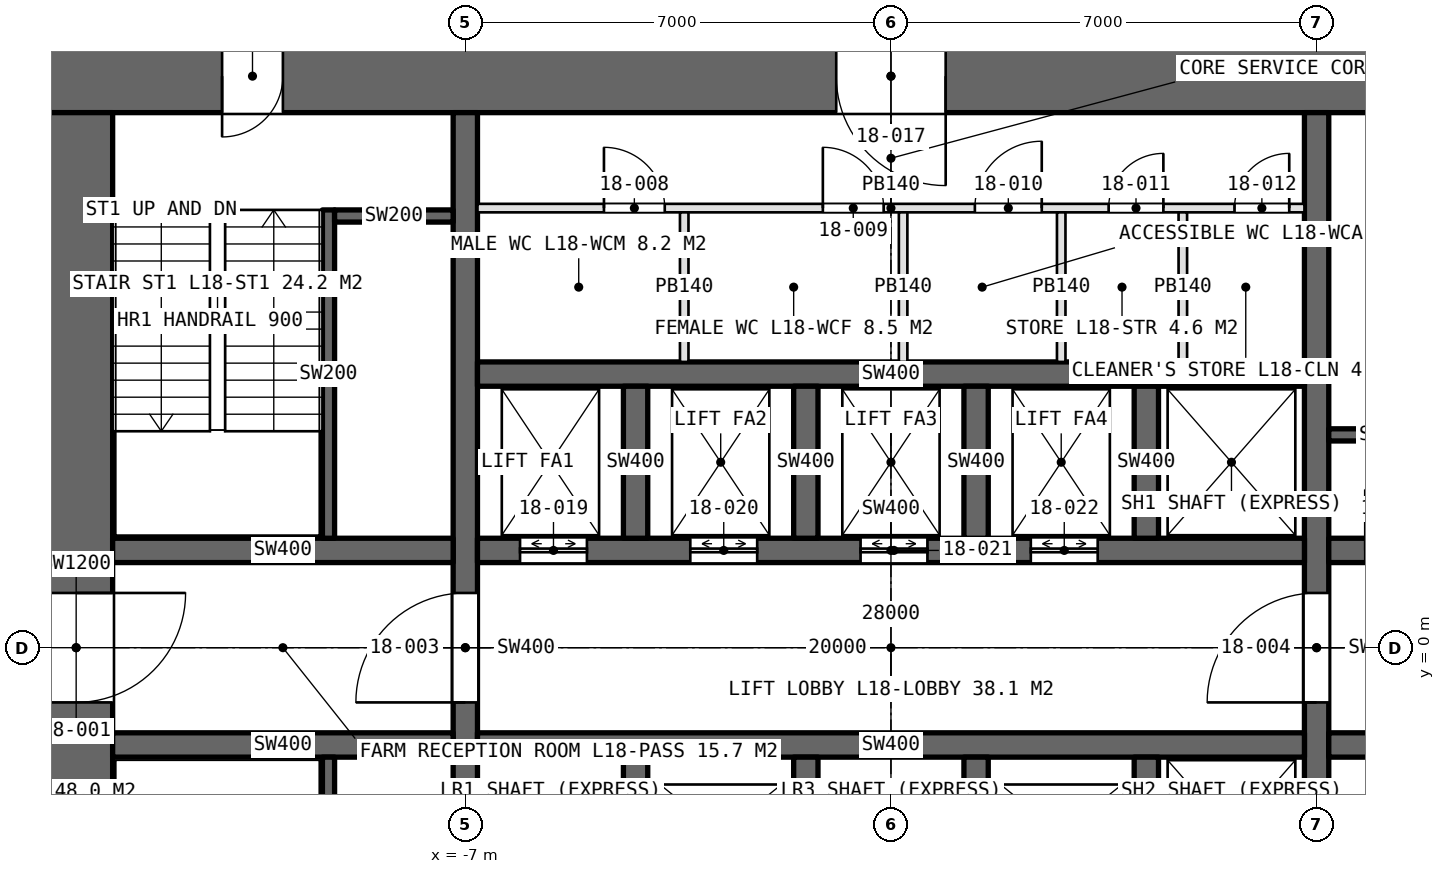
"""IFC4 building model, lengths in metres.
Left out: names, types, materials, properties, quantities, classifications, styles, units other than length and angle.
Written with IfcOpenShell. Run it as: python <this file> out.ifc"""

import sys

from ifc_helpers import new_model, si_unit, direction, frame, frame_2d, origin, place, context, subcontext, project, spatial, rectangle, extrude, element, fill, save


model = new_model("IFC4")
c1 = context("Model", 3, precision=1e-05, world=origin(), true_north=direction((0.0, 1.0)))
c2 = subcontext(c1, "Body", "Model", "MODEL_VIEW")
j1 = project(units=[si_unit("LENGTHUNIT", "METRE"), si_unit("PLANEANGLEUNIT", "RADIAN")], contexts=[c1])
p1 = place(None, origin())
s1 = spatial("IfcSite", under=j1, at=p1, CompositionType="ELEMENT")
p2 = place(p1, origin())
s2 = spatial("IfcBuilding", under=s1, at=p2, CompositionType="ELEMENT")
p3 = place(p2, frame((0.0, 0.0, 90.0)))
s3 = spatial("IfcBuildingStorey", under=s2, at=p3, CompositionType="ELEMENT", Elevation=90.0)
p4 = place(p3, frame((14.0, 9.4, 0.0), z_axis=(0.0, 0.0, 1.0), x_axis=(-1.0, 0.0, 0.0)))
e1 = element("IfcWall", 1, at=p4, inside=s3, PredefinedType="SHEAR", context=c2, shape_type="SweptSolid", body=[
    extrude(rectangle(XDim=28.0, YDim=1.2, at=frame_2d((14.0, 0.0))), origin(), (0.0, 0.0, 1.0), 5.0),
])
p5 = place(p4, frame((24.0, 0.0, 0.0)))
e2 = element("IfcOpeningElement", 2, at=p5, cuts=e1, PredefinedType="OPENING", context=c2, shape_type="SweptSolid", body=[
    extrude(rectangle(XDim=1.0, YDim=2.4, at=frame_2d((0.5, 1.2))), frame((0.0, 0.61, 0.0), z_axis=(0.0, -1.0, 0.0), x_axis=(1.0, 0.0, 0.0)), (0.0, 0.0, 1.0), 1.22),
])
p6 = place(p4, frame((13.1, 0.0, 0.0)))
e3 = element("IfcOpeningElement", 3, at=p6, cuts=e1, PredefinedType="OPENING", context=c2, shape_type="SweptSolid", body=[
    extrude(rectangle(XDim=1.8, YDim=2.4, at=frame_2d((0.9, 1.2))), frame((0.0, 0.61, 0.0), z_axis=(0.0, -1.0, 0.0), x_axis=(1.0, 0.0, 0.0)), (0.0, 0.0, 1.0), 1.22),
])
p7 = place(p3, frame((-13.4, 8.8, 0.0), z_axis=(0.0, 0.0, 1.0), x_axis=(0.0, -1.0, 0.0)))
e4 = element("IfcWall", 4, at=p7, inside=s3, PredefinedType="SHEAR", context=c2, shape_type="SweptSolid", body=[
    extrude(rectangle(XDim=17.6, YDim=1.2, at=frame_2d((8.8, 0.0))), origin(), (0.0, 0.0, 1.0), 5.0),
])
p8 = place(p7, frame((7.9, 0.0, 0.0)))
e5 = element("IfcOpeningElement", 5, at=p8, cuts=e4, PredefinedType="OPENING", context=c2, shape_type="SweptSolid", body=[
    extrude(rectangle(XDim=1.8, YDim=2.4, at=frame_2d((0.9, 1.2))), frame((0.0, 0.61, 0.0), z_axis=(0.0, -1.0, 0.0), x_axis=(1.0, 0.0, 0.0)), (0.0, 0.0, 1.0), 1.22),
])
p9 = place(p7, frame((16.5, 0.0, 0.0)))
e6 = element("IfcOpeningElement", 6, at=p9, cuts=e4, PredefinedType="OPENING", context=c2, shape_type="SweptSolid", body=[
    extrude(rectangle(XDim=1.0, YDim=2.4, at=frame_2d((0.5, 1.2))), frame((0.0, 0.61, 0.0), z_axis=(0.0, -1.0, 0.0), x_axis=(1.0, 0.0, 0.0)), (0.0, 0.0, 1.0), 1.22),
])
p10 = place(p3, frame((-7.0, -8.8, 0.0), z_axis=(0.0, 0.0, 1.0), x_axis=(0.0, 1.0, 0.0)))
e7 = element("IfcWall", 7, at=p10, inside=s3, PredefinedType="SHEAR", context=c2, shape_type="SweptSolid", body=[
    extrude(rectangle(XDim=17.6, YDim=0.4, at=frame_2d((8.8, 0.0))), origin(), (0.0, 0.0, 1.0), 5.0),
])
p11 = place(p10, frame((7.9, 0.0, 0.0)))
e8 = element("IfcOpeningElement", 8, at=p11, cuts=e7, PredefinedType="OPENING", context=c2, shape_type="SweptSolid", body=[
    extrude(rectangle(XDim=1.8, YDim=2.4, at=frame_2d((0.9, 1.2))), frame((0.0, 0.21, 0.0), z_axis=(0.0, -1.0, 0.0), x_axis=(1.0, 0.0, 0.0)), (0.0, 0.0, 1.0), 0.42),
])
p12 = place(p3, frame((7.0, -8.8, 0.0), z_axis=(0.0, 0.0, 1.0), x_axis=(0.0, 1.0, 0.0)))
e9 = element("IfcWall", 9, at=p12, inside=s3, PredefinedType="SHEAR", context=c2, shape_type="SweptSolid", body=[
    extrude(rectangle(XDim=17.6, YDim=0.4, at=frame_2d((8.8, 0.0))), origin(), (0.0, 0.0, 1.0), 5.0),
])
p13 = place(p12, frame((7.9, 0.0, 0.0)))
e10 = element("IfcOpeningElement", 10, at=p13, cuts=e9, PredefinedType="OPENING", context=c2, shape_type="SweptSolid", body=[
    extrude(rectangle(XDim=1.8, YDim=2.4, at=frame_2d((0.9, 1.2))), frame((0.0, 0.21, 0.0), z_axis=(0.0, -1.0, 0.0), x_axis=(1.0, 0.0, 0.0)), (0.0, 0.0, 1.0), 0.42),
])
p14 = place(p3, frame((-6.8, 1.6, 0.0), z_axis=(0.0, 0.0, 1.0), x_axis=(1.0, 0.0, 0.0)))
e11 = element("IfcWall", 11, at=p14, inside=s3, PredefinedType="SHEAR", context=c2, shape_type="SweptSolid", body=[
    extrude(rectangle(XDim=13.6, YDim=0.4, at=frame_2d((6.8, 0.0))), origin(), (0.0, 0.0, 1.0), 5.0),
])
p15 = place(p14, frame((0.7, 0.0, 0.0)))
e12 = element("IfcOpeningElement", 12, at=p15, cuts=e11, PredefinedType="OPENING", context=c2, shape_type="SweptSolid", body=[
    extrude(rectangle(XDim=1.1, YDim=2.4, at=frame_2d((0.55, 1.2))), frame((0.0, 0.21, 0.0), z_axis=(0.0, -1.0, 0.0), x_axis=(1.0, 0.0, 0.0)), (0.0, 0.0, 1.0), 0.42),
])
p16 = place(p14, frame((3.5, 0.0, 0.0)))
e13 = element("IfcOpeningElement", 13, at=p16, cuts=e11, PredefinedType="OPENING", context=c2, shape_type="SweptSolid", body=[
    extrude(rectangle(XDim=1.1, YDim=2.4, at=frame_2d((0.55, 1.2))), frame((0.0, 0.21, 0.0), z_axis=(0.0, -1.0, 0.0), x_axis=(1.0, 0.0, 0.0)), (0.0, 0.0, 1.0), 0.42),
])
p17 = place(p14, frame((6.3, 0.0, 0.0)))
e14 = element("IfcOpeningElement", 14, at=p17, cuts=e11, PredefinedType="OPENING", context=c2, shape_type="SweptSolid", body=[
    extrude(rectangle(XDim=1.1, YDim=2.4, at=frame_2d((0.55, 1.2))), frame((0.0, 0.21, 0.0), z_axis=(0.0, -1.0, 0.0), x_axis=(1.0, 0.0, 0.0)), (0.0, 0.0, 1.0), 0.42),
])
p18 = place(p14, frame((9.1, 0.0, 0.0)))
e15 = element("IfcOpeningElement", 15, at=p18, cuts=e11, PredefinedType="OPENING", context=c2, shape_type="SweptSolid", body=[
    extrude(rectangle(XDim=1.1, YDim=2.4, at=frame_2d((0.55, 1.2))), frame((0.0, 0.21, 0.0), z_axis=(0.0, -1.0, 0.0), x_axis=(1.0, 0.0, 0.0)), (0.0, 0.0, 1.0), 0.42),
])
for number, where, z_axis, x_axis in (
    (16, (-6.8, -1.6, 0.0), (0.0, 0.0, 1.0), (1.0, 0.0, 0.0)),
    (17, (-6.8, 4.5, 0.0), (0.0, 0.0, 1.0), (1.0, 0.0, 0.0)),
):
    element("IfcWall", number, at=place(p3, frame(where, z_axis=z_axis, x_axis=x_axis)), inside=s3, PredefinedType="SHEAR", context=c2, shape_type="SweptSolid", body=[
        extrude(rectangle(XDim=13.6, YDim=0.4, at=frame_2d((6.8, 0.0))), origin(), (0.0, 0.0, 1.0), 5.0),
    ])
for number, where, z_axis, x_axis in (
    (18, (-12.8, 1.6, 0.0), (0.0, 0.0, 1.0), (1.0, 0.0, 0.0)),
    (19, (-12.8, -1.6, 0.0), (0.0, 0.0, 1.0), (1.0, 0.0, 0.0)),
):
    element("IfcWall", number, at=place(p3, frame(where, z_axis=z_axis, x_axis=x_axis)), inside=s3, PredefinedType="SHEAR", context=c2, shape_type="SweptSolid", body=[
        extrude(rectangle(XDim=5.6, YDim=0.4, at=frame_2d((2.8, 0.0))), origin(), (0.0, 0.0, 1.0), 5.0),
    ])
p19 = place(p3, frame((7.2, 1.6, 0.0), z_axis=(0.0, 0.0, 1.0), x_axis=(1.0, 0.0, 0.0)))
e20 = element("IfcWall", 20, at=p19, inside=s3, PredefinedType="SHEAR", context=c2, shape_type="SweptSolid", body=[
    extrude(rectangle(XDim=5.6, YDim=0.4, at=frame_2d((2.8, 0.0))), origin(), (0.0, 0.0, 1.0), 5.0),
])
p20 = place(p19, frame((0.6, 0.0, 0.0)))
e21 = element("IfcOpeningElement", 21, at=p20, cuts=e20, PredefinedType="OPENING", context=c2, shape_type="SweptSolid", body=[
    extrude(rectangle(XDim=1.0, YDim=2.4, at=frame_2d((0.5, 1.2))), frame((0.0, 0.21, 0.0), z_axis=(0.0, -1.0, 0.0), x_axis=(1.0, 0.0, 0.0)), (0.0, 0.0, 1.0), 0.42),
])
p21 = place(p3, frame((7.2, -1.6, 0.0), z_axis=(0.0, 0.0, 1.0), x_axis=(1.0, 0.0, 0.0)))
e22 = element("IfcWall", 22, at=p21, inside=s3, PredefinedType="SHEAR", context=c2, shape_type="SweptSolid", body=[
    extrude(rectangle(XDim=5.6, YDim=0.4, at=frame_2d((2.8, 0.0))), origin(), (0.0, 0.0, 1.0), 5.0),
])
p22 = place(p21, frame((0.9, 0.0, 0.0)))
e23 = element("IfcOpeningElement", 23, at=p22, cuts=e22, PredefinedType="OPENING", context=c2, shape_type="SweptSolid", body=[
    extrude(rectangle(XDim=1.3, YDim=2.4, at=frame_2d((0.65, 1.2))), frame((0.0, 0.21, 0.0), z_axis=(0.0, -1.0, 0.0), x_axis=(1.0, 0.0, 0.0)), (0.0, 0.0, 1.0), 0.42),
])
p23 = place(p21, frame((3.9, 0.0, 0.0)))
e24 = element("IfcOpeningElement", 24, at=p23, cuts=e22, PredefinedType="OPENING", context=c2, shape_type="SweptSolid", body=[
    extrude(rectangle(XDim=1.3, YDim=2.4, at=frame_2d((0.65, 1.2))), frame((0.0, 0.21, 0.0), z_axis=(0.0, -1.0, 0.0), x_axis=(1.0, 0.0, 0.0)), (0.0, 0.0, 1.0), 0.42),
])
for number, where, z_axis, x_axis in (
    (25, (-4.2, 1.8, 0.0), (0.0, 0.0, 1.0), (0.0, 1.0, 0.0)),
    (26, (-4.2, -4.3, 0.0), (0.0, 0.0, 1.0), (0.0, 1.0, 0.0)),
    (27, (-1.4, 1.8, 0.0), (0.0, 0.0, 1.0), (0.0, 1.0, 0.0)),
    (28, (-1.4, -4.3, 0.0), (0.0, 0.0, 1.0), (0.0, 1.0, 0.0)),
    (29, (1.4, 1.8, 0.0), (0.0, 0.0, 1.0), (0.0, 1.0, 0.0)),
    (30, (1.4, -4.3, 0.0), (0.0, 0.0, 1.0), (0.0, 1.0, 0.0)),
    (31, (4.2, 1.8, 0.0), (0.0, 0.0, 1.0), (0.0, 1.0, 0.0)),
    (32, (4.2, -4.3, 0.0), (0.0, 0.0, 1.0), (0.0, 1.0, 0.0)),
):
    element("IfcWall", number, at=place(p3, frame(where, z_axis=z_axis, x_axis=x_axis)), inside=s3, PredefinedType="SHEAR", context=c2, shape_type="SweptSolid", body=[
        extrude(rectangle(XDim=2.5, YDim=0.4, at=frame_2d((1.25, 0.0))), origin(), (0.0, 0.0, 1.0), 5.0),
    ])
p24 = place(p3, frame((-6.8, 7.23, 0.0), z_axis=(0.0, 0.0, 1.0), x_axis=(1.0, 0.0, 0.0)))
e33 = element("IfcWall", 33, at=p24, inside=s3, PredefinedType="PARTITIONING", context=c2, shape_type="SweptSolid", body=[
    extrude(rectangle(XDim=13.6, YDim=0.14, at=frame_2d((6.8, 0.0))), origin(), (0.0, 0.0, 1.0), 4.75),
])
p25 = place(p24, frame((2.08, 0.0, 0.0)))
e34 = element("IfcOpeningElement", 34, at=p25, cuts=e33, PredefinedType="OPENING", context=c2, shape_type="SweptSolid", body=[
    extrude(rectangle(XDim=1.0, YDim=2.4, at=frame_2d((0.5, 1.2))), frame((0.0, 0.08, 0.0), z_axis=(0.0, -1.0, 0.0), x_axis=(1.0, 0.0, 0.0)), (0.0, 0.0, 1.0), 0.16),
])
p26 = place(p24, frame((5.68, 0.0, 0.0)))
e35 = element("IfcOpeningElement", 35, at=p26, cuts=e33, PredefinedType="OPENING", context=c2, shape_type="SweptSolid", body=[
    extrude(rectangle(XDim=1.0, YDim=2.4, at=frame_2d((0.5, 1.2))), frame((0.0, 0.08, 0.0), z_axis=(0.0, -1.0, 0.0), x_axis=(1.0, 0.0, 0.0)), (0.0, 0.0, 1.0), 0.16),
])
p27 = place(p24, frame((8.18, 0.0, 0.0)))
e36 = element("IfcOpeningElement", 36, at=p27, cuts=e33, PredefinedType="OPENING", context=c2, shape_type="SweptSolid", body=[
    extrude(rectangle(XDim=1.1, YDim=2.4, at=frame_2d((0.55, 1.2))), frame((0.0, 0.08, 0.0), z_axis=(0.0, -1.0, 0.0), x_axis=(1.0, 0.0, 0.0)), (0.0, 0.0, 1.0), 0.16),
])
p28 = place(p24, frame((10.38, 0.0, 0.0)))
e37 = element("IfcOpeningElement", 37, at=p28, cuts=e33, PredefinedType="OPENING", context=c2, shape_type="SweptSolid", body=[
    extrude(rectangle(XDim=0.9, YDim=2.4, at=frame_2d((0.45, 1.2))), frame((0.0, 0.08, 0.0), z_axis=(0.0, -1.0, 0.0), x_axis=(1.0, 0.0, 0.0)), (0.0, 0.0, 1.0), 0.16),
])
p29 = place(p24, frame((12.45, 0.0, 0.0)))
e38 = element("IfcOpeningElement", 38, at=p29, cuts=e33, PredefinedType="OPENING", context=c2, shape_type="SweptSolid", body=[
    extrude(rectangle(XDim=0.9, YDim=2.4, at=frame_2d((0.45, 1.2))), frame((0.0, 0.08, 0.0), z_axis=(0.0, -1.0, 0.0), x_axis=(1.0, 0.0, 0.0)), (0.0, 0.0, 1.0), 0.16),
])
for number, where, z_axis, x_axis in (
    (39, (-3.4, 4.7, 0.0), (0.0, 0.0, 1.0), (0.0, 1.0, 0.0)),
    (40, (0.2, 4.7, 0.0), (0.0, 0.0, 1.0), (0.0, 1.0, 0.0)),
    (41, (2.8, 4.7, 0.0), (0.0, 0.0, 1.0), (0.0, 1.0, 0.0)),
    (42, (4.8, 4.7, 0.0), (0.0, 0.0, 1.0), (0.0, 1.0, 0.0)),
):
    element("IfcWall", number, at=place(p3, frame(where, z_axis=z_axis, x_axis=x_axis)), inside=s3, PredefinedType="PARTITIONING", context=c2, shape_type="SweptSolid", body=[
        extrude(rectangle(XDim=2.46, YDim=0.14, at=frame_2d((1.23, 0.0))), origin(), (0.0, 0.0, 1.0), 4.75),
    ])
p30 = place(p3, frame((-9.25, 7.2, 0.0), z_axis=(0.0, 0.0, 1.0), x_axis=(0.0, -1.0, 0.0)))
e43 = element("IfcWall", 43, at=p30, inside=s3, PredefinedType="SOLIDWALL", context=c2, shape_type="SweptSolid", body=[
    extrude(rectangle(XDim=5.4, YDim=0.2, at=frame_2d((2.7, 0.0))), origin(), (0.0, 0.0, 1.0), 5.0),
])
p31 = place(p3, frame((-9.15, 7.1, 0.0), z_axis=(0.0, 0.0, 1.0), x_axis=(1.0, 0.0, 0.0)))
e44 = element("IfcWall", 44, at=p31, inside=s3, PredefinedType="SOLIDWALL", context=c2, shape_type="SweptSolid", body=[
    extrude(rectangle(XDim=1.95, YDim=0.2, at=frame_2d((0.975, 0.0))), origin(), (0.0, 0.0, 1.0), 5.0),
])
p32 = place(p3, frame((-9.25, -7.2, 0.0), z_axis=(0.0, 0.0, 1.0), x_axis=(0.0, 1.0, 0.0)))
e45 = element("IfcWall", 45, at=p32, inside=s3, PredefinedType="SOLIDWALL", context=c2, shape_type="SweptSolid", body=[
    extrude(rectangle(XDim=5.4, YDim=0.2, at=frame_2d((2.7, 0.0))), origin(), (0.0, 0.0, 1.0), 5.0),
])
p33 = place(p3, frame((9.15, 3.5, 0.0), z_axis=(0.0, 0.0, 1.0), x_axis=(-1.0, 0.0, 0.0)))
e46 = element("IfcWall", 46, at=p33, inside=s3, PredefinedType="SOLIDWALL", context=c2, shape_type="SweptSolid", body=[
    extrude(rectangle(XDim=1.95, YDim=0.2, at=frame_2d((0.975, 0.0))), origin(), (0.0, 0.0, 1.0), 5.0),
])
p34 = place(p8, origin())
e47 = element("IfcDoor", 47, at=p34, inside=s3, OperationType="DOUBLE_DOOR_SINGLE_SWING", PredefinedType="DOOR", context=c2, shape_type="SweptSolid", body=[
    extrude(rectangle(XDim=1.8, YDim=2.4, at=frame_2d((0.9, 1.2))), frame((0.0, 0.025, 0.0), z_axis=(0.0, -1.0, 0.0), x_axis=(1.0, 0.0, 0.0)), (0.0, 0.0, 1.0), 0.05),
])
fill(e5, e47)
p35 = place(p11, origin())
e48 = element("IfcDoor", 48, at=p35, inside=s3, OperationType="DOUBLE_DOOR_SINGLE_SWING", PredefinedType="DOOR", context=c2, shape_type="SweptSolid", body=[
    extrude(rectangle(XDim=1.8, YDim=2.4, at=frame_2d((0.9, 1.2))), frame((0.0, 0.025, 0.0), z_axis=(0.0, -1.0, 0.0), x_axis=(1.0, 0.0, 0.0)), (0.0, 0.0, 1.0), 0.05),
])
fill(e8, e48)
p36 = place(p13, origin())
e49 = element("IfcDoor", 49, at=p36, inside=s3, OperationType="DOUBLE_DOOR_SINGLE_SWING", PredefinedType="DOOR", context=c2, shape_type="SweptSolid", body=[
    extrude(rectangle(XDim=1.8, YDim=2.4, at=frame_2d((0.9, 1.2))), frame((0.0, 0.025, 0.0), z_axis=(0.0, -1.0, 0.0), x_axis=(1.0, 0.0, 0.0)), (0.0, 0.0, 1.0), 0.05),
])
fill(e10, e49)
p37 = place(p5, origin())
e50 = element("IfcDoor", 50, at=p37, inside=s3, OperationType="SINGLE_SWING_RIGHT", PredefinedType="DOOR", context=c2, shape_type="SweptSolid", body=[
    extrude(rectangle(XDim=1.0, YDim=2.4, at=frame_2d((0.5, 1.2))), frame((0.0, 0.025, 0.0), z_axis=(0.0, -1.0, 0.0), x_axis=(1.0, 0.0, 0.0)), (0.0, 0.0, 1.0), 0.05),
])
fill(e2, e50)
p38 = place(p25, origin())
e51 = element("IfcDoor", 51, at=p38, inside=s3, OperationType="SINGLE_SWING_LEFT", PredefinedType="DOOR", context=c2, shape_type="SweptSolid", body=[
    extrude(rectangle(XDim=1.0, YDim=2.4, at=frame_2d((0.5, 1.2))), frame((0.0, 0.025, 0.0), z_axis=(0.0, -1.0, 0.0), x_axis=(1.0, 0.0, 0.0)), (0.0, 0.0, 1.0), 0.05),
])
fill(e34, e51)
p39 = place(p26, origin())
e52 = element("IfcDoor", 52, at=p39, inside=s3, OperationType="SINGLE_SWING_LEFT", PredefinedType="DOOR", context=c2, shape_type="SweptSolid", body=[
    extrude(rectangle(XDim=1.0, YDim=2.4, at=frame_2d((0.5, 1.2))), frame((0.0, 0.025, 0.0), z_axis=(0.0, -1.0, 0.0), x_axis=(1.0, 0.0, 0.0)), (0.0, 0.0, 1.0), 0.05),
])
fill(e35, e52)
p40 = place(p27, origin())
e53 = element("IfcDoor", 53, at=p40, inside=s3, OperationType="SINGLE_SWING_RIGHT", PredefinedType="DOOR", context=c2, shape_type="SweptSolid", body=[
    extrude(rectangle(XDim=1.1, YDim=2.4, at=frame_2d((0.55, 1.2))), frame((0.0, 0.025, 0.0), z_axis=(0.0, -1.0, 0.0), x_axis=(1.0, 0.0, 0.0)), (0.0, 0.0, 1.0), 0.05),
])
fill(e36, e53)
p41 = place(p28, origin())
e54 = element("IfcDoor", 54, at=p41, inside=s3, OperationType="SINGLE_SWING_RIGHT", PredefinedType="DOOR", context=c2, shape_type="SweptSolid", body=[
    extrude(rectangle(XDim=0.9, YDim=2.4, at=frame_2d((0.45, 1.2))), frame((0.0, 0.025, 0.0), z_axis=(0.0, -1.0, 0.0), x_axis=(1.0, 0.0, 0.0)), (0.0, 0.0, 1.0), 0.05),
])
fill(e37, e54)
p42 = place(p29, origin())
e55 = element("IfcDoor", 55, at=p42, inside=s3, OperationType="SINGLE_SWING_RIGHT", PredefinedType="DOOR", context=c2, shape_type="SweptSolid", body=[
    extrude(rectangle(XDim=0.9, YDim=2.4, at=frame_2d((0.45, 1.2))), frame((0.0, 0.025, 0.0), z_axis=(0.0, -1.0, 0.0), x_axis=(1.0, 0.0, 0.0)), (0.0, 0.0, 1.0), 0.05),
])
fill(e38, e55)
p43 = place(p6, origin())
e56 = element("IfcDoor", 56, at=p43, inside=s3, OperationType="DOUBLE_DOOR_SINGLE_SWING", PredefinedType="DOOR", context=c2, shape_type="SweptSolid", body=[
    extrude(rectangle(XDim=1.8, YDim=2.4, at=frame_2d((0.9, 1.2))), frame((0.0, 0.025, 0.0), z_axis=(0.0, -1.0, 0.0), x_axis=(1.0, 0.0, 0.0)), (0.0, 0.0, 1.0), 0.05),
])
fill(e3, e56)
p44 = place(p15, origin())
e57 = element("IfcDoor", 57, at=p44, inside=s3, OperationType="DOUBLE_DOOR_SLIDING", PredefinedType="DOOR", context=c2, shape_type="SweptSolid", body=[
    extrude(rectangle(XDim=1.1, YDim=2.4, at=frame_2d((0.55, 1.2))), frame((0.0, 0.025, 0.0), z_axis=(0.0, -1.0, 0.0), x_axis=(1.0, 0.0, 0.0)), (0.0, 0.0, 1.0), 0.05),
])
fill(e12, e57)
p45 = place(p16, origin())
e58 = element("IfcDoor", 58, at=p45, inside=s3, OperationType="DOUBLE_DOOR_SLIDING", PredefinedType="DOOR", context=c2, shape_type="SweptSolid", body=[
    extrude(rectangle(XDim=1.1, YDim=2.4, at=frame_2d((0.55, 1.2))), frame((0.0, 0.025, 0.0), z_axis=(0.0, -1.0, 0.0), x_axis=(1.0, 0.0, 0.0)), (0.0, 0.0, 1.0), 0.05),
])
fill(e13, e58)
p46 = place(p17, origin())
e59 = element("IfcDoor", 59, at=p46, inside=s3, OperationType="DOUBLE_DOOR_SLIDING", PredefinedType="DOOR", context=c2, shape_type="SweptSolid", body=[
    extrude(rectangle(XDim=1.1, YDim=2.4, at=frame_2d((0.55, 1.2))), frame((0.0, 0.025, 0.0), z_axis=(0.0, -1.0, 0.0), x_axis=(1.0, 0.0, 0.0)), (0.0, 0.0, 1.0), 0.05),
])
fill(e14, e59)
p47 = place(p18, origin())
e60 = element("IfcDoor", 60, at=p47, inside=s3, OperationType="DOUBLE_DOOR_SLIDING", PredefinedType="DOOR", context=c2, shape_type="SweptSolid", body=[
    extrude(rectangle(XDim=1.1, YDim=2.4, at=frame_2d((0.55, 1.2))), frame((0.0, 0.025, 0.0), z_axis=(0.0, -1.0, 0.0), x_axis=(1.0, 0.0, 0.0)), (0.0, 0.0, 1.0), 0.05),
])
fill(e15, e60)
save(model, sys.argv[1])
